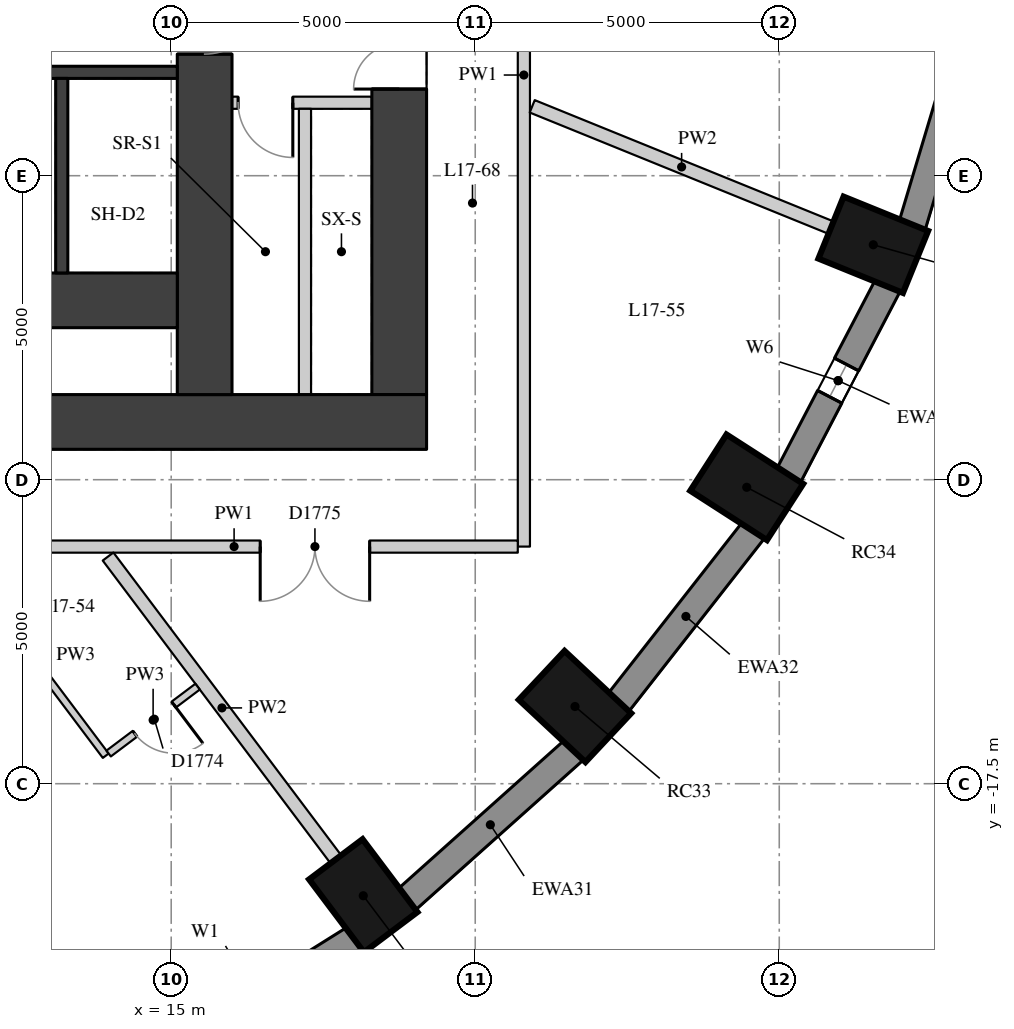
"""IFC4 building model, lengths in metres.
Left out: names, types, materials, properties, quantities, classifications, styles, units other than length and angle.
Written with IfcOpenShell. Run it as: python <this file> out.ifc"""

import sys

from ifc_helpers import new_model, si_unit, direction, frame, frame_2d, origin, origin_2d, place, context, subcontext, project, spatial, rectangle, extrude, element, fill, save


model = new_model("IFC4")
c1 = context("Model", 3, precision=1e-05, world=origin(), true_north=direction((0.0, 1.0)))
c2 = subcontext(c1, "Body", "Model", "MODEL_VIEW")
j1 = project(units=[si_unit("LENGTHUNIT", "METRE"), si_unit("PLANEANGLEUNIT", "RADIAN")], contexts=[c1])
p1 = place(None, origin())
s1 = spatial("IfcSite", under=j1, at=p1, CompositionType="ELEMENT")
p2 = place(p1, origin())
s2 = spatial("IfcBuilding", under=s1, at=p2, CompositionType="ELEMENT")
p3 = place(p2, frame((0.0, 0.0, 64.6)))
s3 = spatial("IfcBuildingStorey", under=s2, at=p3, CompositionType="ELEMENT", Elevation=64.6)
for number, where, z_axis, x_axis in (
    (1, (18.159, -19.343, 0.0), (0.0, 0.0, 1.0), (0.601, -0.799, 0.0)),
    (2, (21.641, -16.23, 0.0), (0.0, 0.0, 1.0), (0.73, -0.683, 0.0)),
    (3, (24.465, -12.625, 0.0), (0.0, 0.0, 1.0), (0.841, -0.541, 0.0)),
    (4, (26.546, -8.636, 0.0), (0.0, 0.0, 1.0), (0.927, -0.376, 0.0)),
):
    element("IfcColumn", number, at=place(p3, frame(where, z_axis=z_axis, x_axis=x_axis)), inside=s3, PredefinedType="COLUMN", context=c2, shape_type="SweptSolid", body=[
        extrude(rectangle(XDim=1.5, YDim=1.1, at=origin_2d()), origin(), (0.0, 0.0, 1.0), 3.3),
    ])
p4 = place(p3, frame((14.817, -22.051, 0.0), z_axis=(0.0, 0.0, 1.0), x_axis=(0.847635480093, 0.530579016629, 0.0)))
e5 = element("IfcWall", 5, at=p4, inside=s3, PredefinedType="SOLIDWALL", context=c2, shape_type="SweptSolid", body=[
    extrude(rectangle(XDim=3.782, YDim=0.45, at=frame_2d((1.891, 0.0))), origin(), (0.0, 0.0, 1.0), 3.02),
])
p5 = place(p4, frame((0.791, 0.0, 0.4)))
e6 = element("IfcOpeningElement", 6, at=p5, cuts=e5, PredefinedType="OPENING", context=c2, shape_type="SweptSolid", body=[
    extrude(rectangle(XDim=2.2, YDim=1.75, at=frame_2d((1.1, 0.875))), frame((0.0, 0.235, 0.0), z_axis=(0.0, -1.0, 0.0), x_axis=(1.0, 0.0, 0.0)), (0.0, 0.0, 1.0), 0.47),
])
p6 = place(p3, frame((18.871, -19.407, 0.0), z_axis=(0.0, 0.0, 1.0), x_axis=(0.745526233716, 0.66647628228, 0.0)))
e7 = element("IfcWall", 7, at=p6, inside=s3, PredefinedType="SOLIDWALL", context=c2, shape_type="SweptSolid", body=[
    extrude(rectangle(XDim=3.697, YDim=0.45, at=frame_2d((1.848, 0.0))), origin(), (0.0, 0.0, 1.0), 3.02),
])
p7 = place(p3, frame((22.352, -16.17, 0.0), z_axis=(0.0, 0.0, 1.0), x_axis=(0.616661975264, 0.787228053529, 0.0)))
e8 = element("IfcWall", 8, at=p7, inside=s3, PredefinedType="SOLIDWALL", context=c2, shape_type="SweptSolid", body=[
    extrude(rectangle(XDim=3.61, YDim=0.45, at=frame_2d((1.805, 0.0))), origin(), (0.0, 0.0, 1.0), 3.02),
])
p8 = place(p3, frame((25.152, -12.437, 0.0), z_axis=(0.0, 0.0, 1.0), x_axis=(0.462492775226, 0.886623050041, 0.0)))
e9 = element("IfcWall", 9, at=p8, inside=s3, PredefinedType="SOLIDWALL", context=c2, shape_type="SweptSolid", body=[
    extrude(rectangle(XDim=3.532, YDim=0.45, at=frame_2d((1.766, 0.0))), origin(), (0.0, 0.0, 1.0), 3.02),
])
p9 = place(p8, frame((1.466, 0.0, 0.4)))
e10 = element("IfcOpeningElement", 10, at=p9, cuts=e9, PredefinedType="OPENING", context=c2, shape_type="SweptSolid", body=[
    extrude(rectangle(XDim=0.6, YDim=1.75, at=frame_2d((0.3, 0.875))), frame((0.0, 0.235, 0.0), z_axis=(0.0, -1.0, 0.0), x_axis=(1.0, 0.0, 0.0)), (0.0, 0.0, 1.0), 0.47),
])
p10 = place(p3, frame((27.185, -8.323, 0.0), z_axis=(0.0, 0.0, 1.0), x_axis=(0.287064133733, 0.957911364963, 0.0)))
e11 = element("IfcWall", 11, at=p10, inside=s3, PredefinedType="SOLIDWALL", context=c2, shape_type="SweptSolid", body=[
    extrude(rectangle(XDim=3.473, YDim=0.45, at=frame_2d((1.737, 0.0))), origin(), (0.0, 0.0, 1.0), 3.02),
])
p11 = place(p3, frame((18.75, -11.1, 0.0), z_axis=(0.0, 0.0, 1.0), x_axis=(0.0, 1.0, 0.0)))
e12 = element("IfcWall", 12, at=p11, inside=s3, PredefinedType="SHEAR", context=c2, shape_type="SweptSolid", body=[
    extrude(rectangle(XDim=22.2, YDim=0.9, at=frame_2d((11.1, 0.0))), origin(), (0.0, 0.0, 1.0), 3.02),
])
p12 = place(p11, frame((16.175, 0.0, 0.0)))
e13 = element("IfcOpeningElement", 13, at=p12, cuts=e12, PredefinedType="OPENING", context=c2, shape_type="SweptSolid", body=[
    extrude(rectangle(XDim=1.5, YDim=2.1, at=frame_2d((0.75, 1.05))), frame((0.0, 0.46, 0.0), z_axis=(0.0, -1.0, 0.0), x_axis=(1.0, 0.0, 0.0)), (0.0, 0.0, 1.0), 0.92),
])
p13 = place(p11, frame((5.025, 0.0, 0.0)))
e14 = element("IfcOpeningElement", 14, at=p13, cuts=e12, PredefinedType="OPENING", context=c2, shape_type="SweptSolid", body=[
    extrude(rectangle(XDim=1.5, YDim=2.1, at=frame_2d((0.75, 1.05))), frame((0.0, 0.46, 0.0), z_axis=(0.0, -1.0, 0.0), x_axis=(1.0, 0.0, 0.0)), (0.0, 0.0, 1.0), 0.92),
])
p14 = place(p3, frame((4.0, -11.55, 0.0), z_axis=(0.0, 0.0, 1.0), x_axis=(1.0, 0.0, 0.0)))
e15 = element("IfcWall", 15, at=p14, inside=s3, PredefinedType="SHEAR", context=c2, shape_type="SweptSolid", body=[
    extrude(rectangle(XDim=15.2, YDim=0.9, at=frame_2d((7.6, 0.0))), origin(), (0.0, 0.0, 1.0), 3.02),
])
p15 = place(p3, frame((15.55, -11.1, 0.0), z_axis=(0.0, 0.0, 1.0), x_axis=(0.0, 1.0, 0.0)))
e16 = element("IfcWall", 16, at=p15, inside=s3, PredefinedType="SHEAR", context=c2, shape_type="SweptSolid", body=[
    extrude(rectangle(XDim=22.2, YDim=0.9, at=frame_2d((11.1, 0.0))), origin(), (0.0, 0.0, 1.0), 3.02),
])
p16 = place(p15, frame((15.6, 0.0, 0.0)))
e17 = element("IfcOpeningElement", 17, at=p16, cuts=e16, PredefinedType="OPENING", context=c2, shape_type="SweptSolid", body=[
    extrude(rectangle(XDim=1.0, YDim=2.1, at=frame_2d((0.5, 1.05))), frame((0.0, 0.46, 0.0), z_axis=(0.0, -1.0, 0.0), x_axis=(1.0, 0.0, 0.0)), (0.0, 0.0, 1.0), 0.92),
])
p17 = place(p15, frame((5.6, 0.0, 0.0)))
e18 = element("IfcOpeningElement", 18, at=p17, cuts=e16, PredefinedType="OPENING", context=c2, shape_type="SweptSolid", body=[
    extrude(rectangle(XDim=1.0, YDim=2.1, at=frame_2d((0.5, 1.05))), frame((0.0, 0.46, 0.0), z_axis=(0.0, -1.0, 0.0), x_axis=(1.0, 0.0, 0.0)), (0.0, 0.0, 1.0), 0.92),
])
p18 = place(p3, frame((4.9, -9.55, 0.0), z_axis=(0.0, 0.0, 1.0), x_axis=(1.0, 0.0, 0.0)))
e19 = element("IfcWall", 19, at=p18, inside=s3, PredefinedType="SHEAR", context=c2, shape_type="SweptSolid", body=[
    extrude(rectangle(XDim=10.2, YDim=0.9, at=frame_2d((5.1, 0.0))), origin(), (0.0, 0.0, 1.0), 3.02),
])
p19 = place(p3, frame((4.9, -5.8, 0.0), z_axis=(0.0, 0.0, 1.0), x_axis=(1.0, 0.0, 0.0)))
e20 = element("IfcWall", 20, at=p19, inside=s3, PredefinedType="SHEAR", context=c2, shape_type="SweptSolid", body=[
    extrude(rectangle(XDim=10.2, YDim=0.2, at=frame_2d((5.1, 0.0))), origin(), (0.0, 0.0, 1.0), 3.02),
])
p20 = place(p3, frame((13.2, -9.1, 0.0), z_axis=(0.0, 0.0, 1.0), x_axis=(0.0, 1.0, 0.0)))
e21 = element("IfcWall", 21, at=p20, inside=s3, PredefinedType="SHEAR", context=c2, shape_type="SweptSolid", body=[
    extrude(rectangle(XDim=3.2, YDim=0.2, at=frame_2d((1.6, 0.0))), origin(), (0.0, 0.0, 1.0), 3.02),
])
p21 = place(p3, frame((16.0, -6.3, 0.0), z_axis=(0.0, 0.0, 1.0), x_axis=(1.0, 0.0, 0.0)))
e22 = element("IfcWall", 22, at=p21, inside=s3, PredefinedType="PARTITIONING", context=c2, shape_type="SweptSolid", body=[
    extrude(rectangle(XDim=2.3, YDim=0.2, at=frame_2d((1.15, 0.0))), origin(), (0.0, 0.0, 1.0), 3.02),
])
p22 = place(p21, frame((0.1, 0.0, 0.0)))
e23 = element("IfcOpeningElement", 23, at=p22, cuts=e22, PredefinedType="OPENING", context=c2, shape_type="SweptSolid", body=[
    extrude(rectangle(XDim=0.9, YDim=2.1, at=frame_2d((0.45, 1.05))), frame((0.0, 0.11, 0.0), z_axis=(0.0, -1.0, 0.0), x_axis=(1.0, 0.0, 0.0)), (0.0, 0.0, 1.0), 0.22),
])
p23 = place(p3, frame((17.2, -11.1, 0.0), z_axis=(0.0, 0.0, 1.0), x_axis=(0.0, 1.0, 0.0)))
e24 = element("IfcWall", 24, at=p23, inside=s3, PredefinedType="PARTITIONING", context=c2, shape_type="SweptSolid", body=[
    extrude(rectangle(XDim=4.7, YDim=0.2, at=frame_2d((2.35, 0.0))), origin(), (0.0, 0.0, 1.0), 3.02),
])
p24 = place(p3, frame((20.8, 1.912, 0.0), z_axis=(0.0, 0.0, 1.0), x_axis=(0.0, -1.0, 0.0)))
e25 = element("IfcWall", 25, at=p24, inside=s3, PredefinedType="PARTITIONING", context=c2, shape_type="SweptSolid", body=[
    extrude(rectangle(XDim=15.512, YDim=0.2, at=frame_2d((7.756, 0.0))), origin(), (0.0, 0.0, 1.0), 3.02),
])
p25 = place(p24, frame((3.11, 0.0, 0.0)))
e26 = element("IfcOpeningElement", 26, at=p25, cuts=e25, PredefinedType="OPENING", context=c2, shape_type="SweptSolid", body=[
    extrude(rectangle(XDim=1.8, YDim=2.1, at=frame_2d((0.9, 1.05))), frame((0.0, 0.11, 0.0), z_axis=(0.0, -1.0, 0.0), x_axis=(1.0, 0.0, 0.0)), (0.0, 0.0, 1.0), 0.22),
])
p26 = place(p3, frame((20.7, -13.6, 0.0), z_axis=(0.0, 0.0, 1.0), x_axis=(-1.0, 0.0, 0.0)))
e27 = element("IfcWall", 27, at=p26, inside=s3, PredefinedType="PARTITIONING", context=c2, shape_type="SweptSolid", body=[
    extrude(rectangle(XDim=9.331, YDim=0.2, at=frame_2d((4.666, 0.0))), origin(), (0.0, 0.0, 1.0), 3.02),
])
p27 = place(p26, frame((2.436, 0.0, 0.0)))
e28 = element("IfcOpeningElement", 28, at=p27, cuts=e27, PredefinedType="OPENING", context=c2, shape_type="SweptSolid", body=[
    extrude(rectangle(XDim=1.8, YDim=2.1, at=frame_2d((0.9, 1.05))), frame((0.0, 0.11, 0.0), z_axis=(0.0, -1.0, 0.0), x_axis=(1.0, 0.0, 0.0)), (0.0, 0.0, 1.0), 0.22),
])
p28 = place(p3, frame((17.708, -18.743, 0.0), z_axis=(0.0, 0.0, 1.0), x_axis=(-0.601177883261, 0.799115231164, 0.0)))
e29 = element("IfcWall", 29, at=p28, inside=s3, PredefinedType="PARTITIONING", context=c2, shape_type="SweptSolid", body=[
    extrude(rectangle(XDim=6.231, YDim=0.22, at=frame_2d((3.116, 0.0))), origin(), (0.0, 0.0, 1.0), 3.02),
])
p29 = place(p3, frame((25.851, -8.354, 0.0), z_axis=(0.0, 0.0, 1.0), x_axis=(-0.926546814299, 0.376179479653, 0.0)))
e30 = element("IfcWall", 30, at=p29, inside=s3, PredefinedType="PARTITIONING", context=c2, shape_type="SweptSolid", body=[
    extrude(rectangle(XDim=5.304, YDim=0.22, at=frame_2d((2.652, 0.0))), origin(), (0.0, 0.0, 1.0), 3.02),
])
p30 = place(p3, frame((11.435, -13.732, 0.0), z_axis=(0.0, 0.0, 1.0), x_axis=(0.601141274104, -0.799142771079, 0.0)))
e31 = element("IfcWall", 31, at=p30, inside=s3, PredefinedType="PARTITIONING", context=c2, shape_type="SweptSolid", body=[
    extrude(rectangle(XDim=4.139, YDim=0.12, at=frame_2d((2.07, 0.0))), origin(), (0.0, 0.0, 1.0), 3.02),
])
p31 = place(p3, frame((13.971, -17.004, 0.0), z_axis=(0.0, 0.0, 1.0), x_axis=(0.799231057954, 0.60102388971, 0.0)))
e32 = element("IfcWall", 32, at=p31, inside=s3, PredefinedType="PARTITIONING", context=c2, shape_type="SweptSolid", body=[
    extrude(rectangle(XDim=1.83, YDim=0.12, at=frame_2d((0.915, 0.0))), origin(), (0.0, 0.0, 1.0), 3.02),
])
p32 = place(p31, frame((0.54, 0.0, 0.0)))
e33 = element("IfcOpeningElement", 33, at=p32, cuts=e32, PredefinedType="OPENING", context=c2, shape_type="SweptSolid", body=[
    extrude(rectangle(XDim=0.8, YDim=2.1, at=frame_2d((0.4, 1.05))), frame((0.0, 0.07, 0.0), z_axis=(0.0, -1.0, 0.0), x_axis=(1.0, 0.0, 0.0)), (0.0, 0.0, 1.0), 0.14),
])
p33 = place(p9, origin())
e34 = element("IfcWindow", 34, at=p33, inside=s3, PartitioningType="SINGLE_PANEL", PredefinedType="WINDOW", context=c2, shape_type="SweptSolid", body=[
    extrude(rectangle(XDim=0.6, YDim=1.75, at=frame_2d((0.3, 0.875))), frame((0.0, 0.035, 0.0), z_axis=(0.0, -1.0, 0.0), x_axis=(1.0, 0.0, 0.0)), (0.0, 0.0, 1.0), 0.06),
])
fill(e10, e34)
p34 = place(p13, origin())
e35 = element("IfcDoor", 35, at=p34, inside=s3, OperationType="DOUBLE_DOOR_SINGLE_SWING", PredefinedType="DOOR", context=c2, shape_type="SweptSolid", body=[
    extrude(rectangle(XDim=1.5, YDim=2.1, at=frame_2d((0.75, 1.05))), frame((0.0, 0.025, 0.0), z_axis=(0.0, -1.0, 0.0), x_axis=(1.0, 0.0, 0.0)), (0.0, 0.0, 1.0), 0.05),
])
fill(e14, e35)
p35 = place(p17, origin())
e36 = element("IfcDoor", 36, at=p35, inside=s3, OperationType="SINGLE_SWING_LEFT", PredefinedType="DOOR", context=c2, shape_type="SweptSolid", body=[
    extrude(rectangle(XDim=1.0, YDim=2.1, at=frame_2d((0.5, 1.05))), frame((0.0, 0.025, 0.0), z_axis=(0.0, -1.0, 0.0), x_axis=(1.0, 0.0, 0.0)), (0.0, 0.0, 1.0), 0.05),
])
fill(e18, e36)
p36 = place(p22, origin())
e37 = element("IfcDoor", 37, at=p36, inside=s3, OperationType="SINGLE_SWING_LEFT", PredefinedType="DOOR", context=c2, shape_type="SweptSolid", body=[
    extrude(rectangle(XDim=0.9, YDim=2.1, at=frame_2d((0.45, 1.05))), frame((0.0, 0.025, 0.0), z_axis=(0.0, -1.0, 0.0), x_axis=(1.0, 0.0, 0.0)), (0.0, 0.0, 1.0), 0.05),
])
fill(e23, e37)
p37 = place(p32, origin())
e38 = element("IfcDoor", 38, at=p37, inside=s3, OperationType="SINGLE_SWING_LEFT", PredefinedType="DOOR", context=c2, shape_type="SweptSolid", body=[
    extrude(rectangle(XDim=0.8, YDim=2.1, at=frame_2d((0.4, 1.05))), frame((0.0, 0.025, 0.0), z_axis=(0.0, -1.0, 0.0), x_axis=(1.0, 0.0, 0.0)), (0.0, 0.0, 1.0), 0.05),
])
fill(e33, e38)
p38 = place(p27, origin())
e39 = element("IfcDoor", 39, at=p38, inside=s3, OperationType="DOUBLE_DOOR_SINGLE_SWING", PredefinedType="DOOR", context=c2, shape_type="SweptSolid", body=[
    extrude(rectangle(XDim=1.8, YDim=2.1, at=frame_2d((0.9, 1.05))), frame((0.0, 0.025, 0.0), z_axis=(0.0, -1.0, 0.0), x_axis=(1.0, 0.0, 0.0)), (0.0, 0.0, 1.0), 0.05),
])
fill(e28, e39)
save(model, sys.argv[1])
